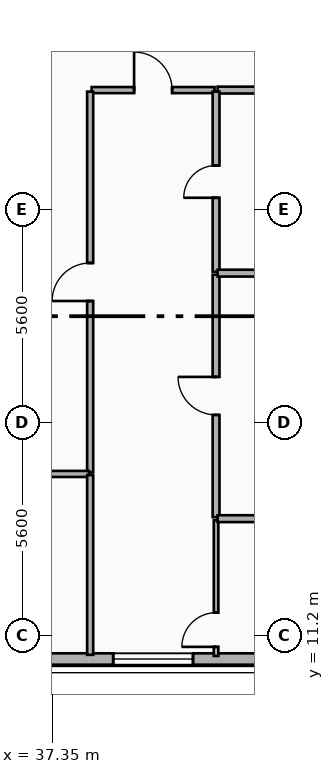
"""IFC4 building model, lengths in metres.
Left out: names, types, materials, properties, quantities, classifications, styles, units other than length and angle.
Written with IfcOpenShell. Run it as: python <this file> out.ifc"""

import sys

from ifc_helpers import new_model, si_unit, direction, frame, frame_2d, origin, place, context, subcontext, project, spatial, rectangle, extrude, element, fill, save


model = new_model("IFC4")
c1 = context("Model", 3, precision=1e-05, world=origin(), true_north=direction((0.0, 1.0)))
c2 = subcontext(c1, "Body", "Model", "MODEL_VIEW")
j1 = project(units=[si_unit("LENGTHUNIT", "METRE"), si_unit("PLANEANGLEUNIT", "RADIAN")], contexts=[c1])
p1 = place(None, origin())
s1 = spatial("IfcSite", under=j1, at=p1, CompositionType="ELEMENT")
p2 = place(p1, origin())
s2 = spatial("IfcBuilding", under=s1, at=p2, CompositionType="ELEMENT")
p3 = place(p2, frame((0.0, 0.0, 141.25)))
s3 = spatial("IfcBuildingStorey", under=s2, at=p3, CompositionType="ELEMENT", Elevation=141.25)
p4 = place(p3, frame((48.0, 10.58, 0.0), z_axis=(0.0, 0.0, 1.0), x_axis=(-1.0, 0.0, 0.0)))
e1 = element("IfcWall", 1, at=p4, inside=s3, PredefinedType="SOLIDWALL", context=c2, shape_type="SweptSolid", body=[
    extrude(rectangle(XDim=38.4, YDim=0.3, at=frame_2d((19.2, 0.0))), origin(), (0.0, 0.0, 1.0), 3.29),
])
p5 = place(p4, frame((36.19, 0.0, 0.48)))
e2 = element("IfcOpeningElement", 2, at=p5, cuts=e1, PredefinedType="OPENING", context=c2, shape_type="SweptSolid", body=[
    extrude(rectangle(XDim=1.8, YDim=1.8, at=frame_2d((0.9, 0.9))), frame((0.0, 0.16, 0.0), z_axis=(0.0, -1.0, 0.0), x_axis=(1.0, 0.0, 0.0)), (0.0, 0.0, 1.0), 0.32),
])
p6 = place(p4, frame((30.06, 0.0, 0.68)))
e3 = element("IfcOpeningElement", 3, at=p6, cuts=e1, PredefinedType="OPENING", context=c2, shape_type="SweptSolid", body=[
    extrude(rectangle(XDim=1.2, YDim=1.5, at=frame_2d((0.6, 0.75))), frame((0.0, 0.16, 0.0), z_axis=(0.0, -1.0, 0.0), x_axis=(1.0, 0.0, 0.0)), (0.0, 0.0, 1.0), 0.32),
])
p7 = place(p4, frame((25.619, 0.0, 0.34)))
e4 = element("IfcOpeningElement", 4, at=p7, cuts=e1, PredefinedType="OPENING", context=c2, shape_type="SweptSolid", body=[
    extrude(rectangle(XDim=1.6, YDim=1.95, at=frame_2d((0.8, 0.975))), frame((0.0, 0.16, 0.0), z_axis=(0.0, -1.0, 0.0), x_axis=(1.0, 0.0, 0.0)), (0.0, 0.0, 1.0), 0.32),
])
p8 = place(p4, frame((32.63, 0.0, 0.65)))
e5 = element("IfcOpeningElement", 5, at=p8, cuts=e1, PredefinedType="OPENING", context=c2, shape_type="SweptSolid", body=[
    extrude(rectangle(XDim=2.1, YDim=2.1, at=frame_2d((1.05, 1.05))), frame((0.0, 0.16, 0.0), z_axis=(0.0, -1.0, 0.0), x_axis=(1.0, 0.0, 0.0)), (0.0, 0.0, 1.0), 0.32),
])
p9 = place(p4, frame((20.1, 0.0, 0.65)))
e6 = element("IfcOpeningElement", 6, at=p9, cuts=e1, PredefinedType="OPENING", context=c2, shape_type="SweptSolid", body=[
    extrude(rectangle(XDim=2.1, YDim=2.1, at=frame_2d((1.05, 1.05))), frame((0.0, 0.16, 0.0), z_axis=(0.0, -1.0, 0.0), x_axis=(1.0, 0.0, 0.0)), (0.0, 0.0, 1.0), 0.32),
])
p10 = place(p4, frame((22.95, 0.0, 0.8)))
e7 = element("IfcOpeningElement", 7, at=p10, cuts=e1, PredefinedType="OPENING", context=c2, shape_type="SweptSolid", body=[
    extrude(rectangle(XDim=1.8, YDim=1.8, at=frame_2d((0.9, 0.9))), frame((0.0, 0.16, 0.0), z_axis=(0.0, -1.0, 0.0), x_axis=(1.0, 0.0, 0.0)), (0.0, 0.0, 1.0), 0.32),
])
p11 = place(p4, frame((13.35, 0.0, 0.65)))
e8 = element("IfcOpeningElement", 8, at=p11, cuts=e1, PredefinedType="OPENING", context=c2, shape_type="SweptSolid", body=[
    extrude(rectangle(XDim=2.1, YDim=2.1, at=frame_2d((1.05, 1.05))), frame((0.0, 0.16, 0.0), z_axis=(0.0, -1.0, 0.0), x_axis=(1.0, 0.0, 0.0)), (0.0, 0.0, 1.0), 0.32),
])
p12 = place(p4, frame((6.944, 0.0, 0.65)))
e9 = element("IfcOpeningElement", 9, at=p12, cuts=e1, PredefinedType="OPENING", context=c2, shape_type="SweptSolid", body=[
    extrude(rectangle(XDim=2.1, YDim=2.1, at=frame_2d((1.05, 1.05))), frame((0.0, 0.16, 0.0), z_axis=(0.0, -1.0, 0.0), x_axis=(1.0, 0.0, 0.0)), (0.0, 0.0, 1.0), 0.32),
])
p13 = place(p4, frame((2.9, 0.0, 0.48)))
e10 = element("IfcOpeningElement", 10, at=p13, cuts=e1, PredefinedType="OPENING", context=c2, shape_type="SweptSolid", body=[
    extrude(rectangle(XDim=1.4, YDim=1.8, at=frame_2d((0.7, 0.9))), frame((0.0, 0.16, 0.0), z_axis=(0.0, -1.0, 0.0), x_axis=(1.0, 0.0, 0.0)), (0.0, 0.0, 1.0), 0.32),
])
p14 = place(p4, frame((0.41, 0.0, 0.48)))
e11 = element("IfcOpeningElement", 11, at=p14, cuts=e1, PredefinedType="OPENING", context=c2, shape_type="SweptSolid", body=[
    extrude(rectangle(XDim=1.8, YDim=1.8, at=frame_2d((0.9, 0.9))), frame((0.0, 0.16, 0.0), z_axis=(0.0, -1.0, 0.0), x_axis=(1.0, 0.0, 0.0)), (0.0, 0.0, 1.0), 0.32),
])
p15 = place(p3, frame((38.39, 25.55, 0.0), z_axis=(0.0, 0.0, 1.0), x_axis=(1.0, 0.0, 0.0)))
e12 = element("IfcWall", 12, at=p15, inside=s3, PredefinedType="PARTITIONING", context=c2, shape_type="SweptSolid", body=[
    extrude(rectangle(XDim=3.233, YDim=0.16, at=frame_2d((1.617, 0.0))), origin(), (0.0, 0.0, 1.0), 3.29),
])
p16 = place(p15, frame((1.116, 0.0, 0.0)))
e13 = element("IfcOpeningElement", 13, at=p16, cuts=e12, PredefinedType="OPENING", context=c2, shape_type="SweptSolid", body=[
    extrude(rectangle(XDim=1.0, YDim=2.15, at=frame_2d((0.5, 1.075))), frame((0.0, 0.09, 0.0), z_axis=(0.0, -1.0, 0.0), x_axis=(1.0, 0.0, 0.0)), (0.0, 0.0, 1.0), 0.18),
])
p17 = place(p3, frame((41.703, 25.55, 0.0), z_axis=(0.0, 0.0, 1.0), x_axis=(1.0, 0.0, 0.0)))
e14 = element("IfcWall", 14, at=p17, inside=s3, PredefinedType="PLUMBINGWALL", context=c2, shape_type="SweptSolid", body=[
    extrude(rectangle(XDim=3.657, YDim=0.18, at=frame_2d((1.829, 0.0))), origin(), (0.0, 0.0, 1.0), 2.456),
])
p18 = place(p3, frame((38.35, 15.49, 0.0), z_axis=(0.0, 0.0, 1.0), x_axis=(0.0, 1.0, 0.0)))
e15 = element("IfcWall", 15, at=p18, inside=s3, PredefinedType="PARTITIONING", context=c2, shape_type="SweptSolid", body=[
    extrude(rectangle(XDim=10.02, YDim=0.16, at=frame_2d((5.01, 0.0))), origin(), (0.0, 0.0, 1.0), 2.72),
])
p19 = place(p18, frame((4.51, 0.0, 0.0)))
e16 = element("IfcOpeningElement", 16, at=p19, cuts=e15, PredefinedType="OPENING", context=c2, shape_type="SweptSolid", body=[
    extrude(rectangle(XDim=1.0, YDim=2.15, at=frame_2d((0.5, 1.075))), frame((0.0, 0.09, 0.0), z_axis=(0.0, -1.0, 0.0), x_axis=(1.0, 0.0, 0.0)), (0.0, 0.0, 1.0), 0.18),
])
p20 = place(p3, frame((41.663, 10.66, 0.0), z_axis=(0.0, 0.0, 1.0), x_axis=(0.0, 1.0, 0.0)))
e17 = element("IfcWall", 17, at=p20, inside=s3, PredefinedType="PARTITIONING", context=c2, shape_type="SweptSolid", body=[
    extrude(rectangle(XDim=3.573, YDim=0.12, at=frame_2d((1.787, 0.0))), origin(), (0.0, 0.0, 1.0), 2.91),
])
p21 = place(p20, frame((0.24, 0.0, 0.0)))
e18 = element("IfcOpeningElement", 18, at=p21, cuts=e17, PredefinedType="OPENING", context=c2, shape_type="SweptSolid", body=[
    extrude(rectangle(XDim=0.9, YDim=2.1, at=frame_2d((0.45, 1.05))), frame((0.0, 0.07, 0.0), z_axis=(0.0, -1.0, 0.0), x_axis=(1.0, 0.0, 0.0)), (0.0, 0.0, 1.0), 0.14),
])
p22 = place(p3, frame((41.663, 14.313, 0.0), z_axis=(0.0, 0.0, 1.0), x_axis=(0.0, 1.0, 0.0)))
e19 = element("IfcWall", 19, at=p22, inside=s3, PredefinedType="PLUMBINGWALL", context=c2, shape_type="SweptSolid", body=[
    extrude(rectangle(XDim=6.38, YDim=0.18, at=frame_2d((3.19, 0.0))), origin(), (0.0, 0.0, 1.0), 2.72),
])
p23 = place(p22, frame((2.69, 0.0, 0.0)))
e20 = element("IfcOpeningElement", 20, at=p23, cuts=e19, PredefinedType="OPENING", context=c2, shape_type="SweptSolid", body=[
    extrude(rectangle(XDim=1.0, YDim=2.15, at=frame_2d((0.5, 1.075))), frame((0.0, 0.1, 0.0), z_axis=(0.0, -1.0, 0.0), x_axis=(1.0, 0.0, 0.0)), (0.0, 0.0, 1.0), 0.2),
])
p24 = place(p3, frame((41.663, 20.773, 0.0), z_axis=(0.0, 0.0, 1.0), x_axis=(0.0, 1.0, 0.0)))
e21 = element("IfcWall", 21, at=p24, inside=s3, PredefinedType="PLUMBINGWALL", context=c2, shape_type="SweptSolid", body=[
    extrude(rectangle(XDim=4.737, YDim=0.18, at=frame_2d((2.369, 0.0))), origin(), (0.0, 0.0, 1.0), 2.88),
])
p25 = place(p24, frame((1.944, 0.0, 0.0)))
e22 = element("IfcOpeningElement", 22, at=p25, cuts=e21, PredefinedType="OPENING", context=c2, shape_type="SweptSolid", body=[
    extrude(rectangle(XDim=0.85, YDim=2.1, at=frame_2d((0.425, 1.05))), frame((0.0, 0.1, 0.0), z_axis=(0.0, -1.0, 0.0), x_axis=(1.0, 0.0, 0.0)), (0.0, 0.0, 1.0), 0.2),
])
for number, where, z_axis, x_axis in (
    (23, (41.703, 14.273, 0.0), (0.0, 0.0, 1.0), (1.0, 0.0, 0.0)),
    (24, (41.703, 20.733, 0.0), (0.0, 0.0, 1.0), (1.0, 0.0, 0.0)),
):
    element("IfcWall", number, at=place(p3, frame(where, z_axis=z_axis, x_axis=x_axis)), inside=s3, PredefinedType="PLUMBINGWALL", context=c2, shape_type="SweptSolid", body=[
        extrude(rectangle(XDim=3.657, YDim=0.18, at=frame_2d((1.829, 0.0))), origin(), (0.0, 0.0, 1.0), 2.456),
    ])
p26 = place(p3, frame((36.38, 15.45, 0.0), z_axis=(0.0, 0.0, 1.0), x_axis=(1.0, 0.0, 0.0)))
e25 = element("IfcWall", 25, at=p26, inside=s3, PredefinedType="PARTITIONING", context=c2, shape_type="SweptSolid", body=[
    extrude(rectangle(XDim=1.94, YDim=0.16, at=frame_2d((0.97, 0.0))), origin(), (0.0, 0.0, 1.0), 2.456),
])
p27 = place(p3, frame((38.35, 10.69, 0.0), z_axis=(0.0, 0.0, 1.0), x_axis=(0.0, 1.0, 0.0)))
e26 = element("IfcWall", 26, at=p27, inside=s3, PredefinedType="PARTITIONING", context=c2, shape_type="SweptSolid", body=[
    extrude(rectangle(XDim=4.73, YDim=0.16, at=frame_2d((2.365, 0.0))), origin(), (0.0, 0.0, 1.0), 2.91),
])
p28 = place(p12, origin())
e27 = element("IfcWindow", 27, at=p28, inside=s3, PartitioningType="SINGLE_PANEL", PredefinedType="WINDOW", context=c2, shape_type="SweptSolid", body=[
    extrude(rectangle(XDim=2.1, YDim=2.1, at=frame_2d((1.05, 1.05))), frame((0.0, 0.03, 0.0), z_axis=(0.0, -1.0, 0.0), x_axis=(1.0, 0.0, 0.0)), (0.0, 0.0, 1.0), 0.06),
])
fill(e9, e27)
p29 = place(p16, origin())
e28 = element("IfcDoor", 28, at=p29, inside=s3, OperationType="SINGLE_SWING_LEFT", PredefinedType="DOOR", context=c2, shape_type="SweptSolid", body=[
    extrude(rectangle(XDim=1.0, YDim=2.15, at=frame_2d((0.5, 1.075))), frame((0.0, 0.025, 0.0), z_axis=(0.0, -1.0, 0.0), x_axis=(1.0, 0.0, 0.0)), (0.0, 0.0, 1.0), 0.05),
])
fill(e13, e28)
p30 = place(p19, origin())
e29 = element("IfcDoor", 29, at=p30, inside=s3, OperationType="SINGLE_SWING_LEFT", PredefinedType="DOOR", context=c2, shape_type="SweptSolid", body=[
    extrude(rectangle(XDim=1.0, YDim=2.15, at=frame_2d((0.5, 1.075))), frame((0.0, 0.025, 0.0), z_axis=(0.0, -1.0, 0.0), x_axis=(1.0, 0.0, 0.0)), (0.0, 0.0, 1.0), 0.05),
])
fill(e16, e29)
p31 = place(p21, origin())
e30 = element("IfcDoor", 30, at=p31, inside=s3, OperationType="SINGLE_SWING_LEFT", PredefinedType="DOOR", context=c2, shape_type="SweptSolid", body=[
    extrude(rectangle(XDim=0.9, YDim=2.1, at=frame_2d((0.45, 1.05))), frame((0.0, 0.025, 0.0), z_axis=(0.0, -1.0, 0.0), x_axis=(1.0, 0.0, 0.0)), (0.0, 0.0, 1.0), 0.05),
])
fill(e18, e30)
p32 = place(p23, origin())
e31 = element("IfcDoor", 31, at=p32, inside=s3, OperationType="SINGLE_SWING_RIGHT", PredefinedType="DOOR", context=c2, shape_type="SweptSolid", body=[
    extrude(rectangle(XDim=1.0, YDim=2.15, at=frame_2d((0.5, 1.075))), frame((0.0, 0.025, 0.0), z_axis=(0.0, -1.0, 0.0), x_axis=(1.0, 0.0, 0.0)), (0.0, 0.0, 1.0), 0.05),
])
fill(e20, e31)
p33 = place(p25, origin())
e32 = element("IfcDoor", 32, at=p33, inside=s3, OperationType="SINGLE_SWING_LEFT", PredefinedType="DOOR", context=c2, shape_type="SweptSolid", body=[
    extrude(rectangle(XDim=0.85, YDim=2.1, at=frame_2d((0.425, 1.05))), frame((0.0, 0.025, 0.0), z_axis=(0.0, -1.0, 0.0), x_axis=(1.0, 0.0, 0.0)), (0.0, 0.0, 1.0), 0.05),
])
fill(e22, e32)
save(model, sys.argv[1])
